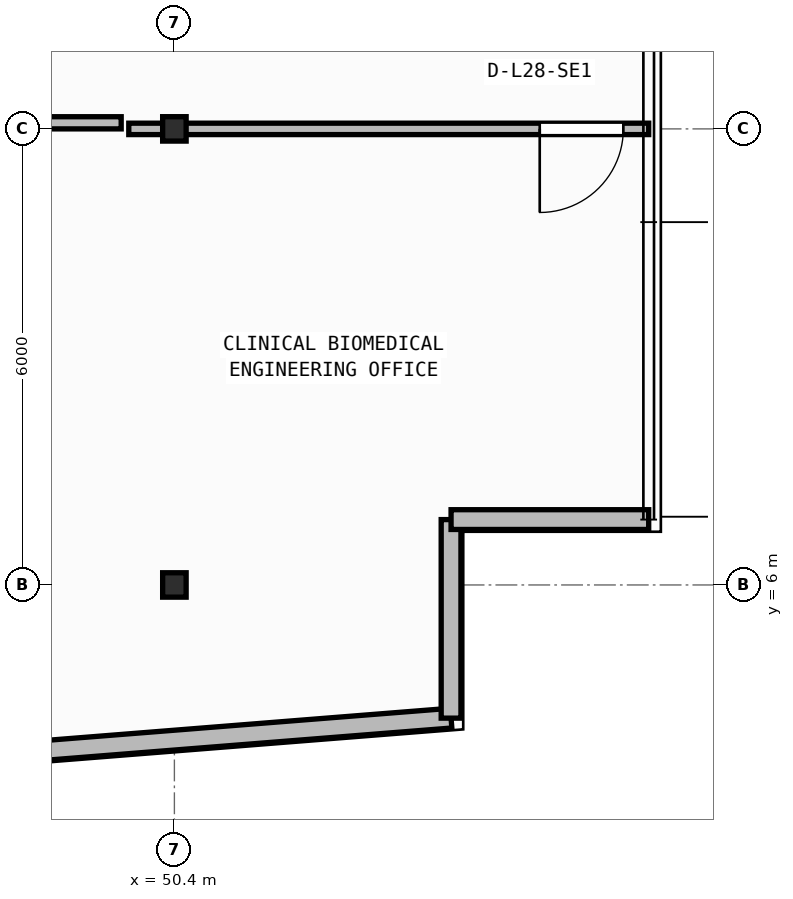
"""IFC4 building model, lengths in metres.
Left out: names, types, materials, properties, quantities, classifications, styles, units other than length and angle.
Written with IfcOpenShell. Run it as: python <this file> out.ifc"""

import sys

from ifc_helpers import new_model, si_unit, direction, frame, frame_2d, origin, origin_2d, place, context, subcontext, project, spatial, rectangle, i_section, extrude, element, fill, save


model = new_model("IFC4")
c1 = context("Model", 3, precision=1e-05, world=origin(), true_north=direction((0.0, 1.0)))
c2 = subcontext(c1, "Body", "Model", "MODEL_VIEW")
j1 = project(units=[si_unit("LENGTHUNIT", "METRE"), si_unit("PLANEANGLEUNIT", "RADIAN")], contexts=[c1])
p1 = place(None, origin())
s1 = spatial("IfcSite", under=j1, at=p1, CompositionType="ELEMENT")
p2 = place(p1, origin())
s2 = spatial("IfcBuilding", under=s1, at=p2, CompositionType="ELEMENT")
p3 = place(p2, frame((0.0, 0.0, 115.2)))
s3 = spatial("IfcBuildingStorey", under=s2, at=p3, CompositionType="ELEMENT", Elevation=115.2)
for number, where, z_axis, x_axis in (
    (1, (50.4, 6.0, 0.0), (0.0, 0.0, 1.0), (1.0, 0.0, 0.0)),
    (2, (50.4, 12.0, 0.0), (0.0, 0.0, 1.0), (1.0, 0.0, 0.0)),
):
    element("IfcColumn", number, at=place(p3, frame(where, z_axis=z_axis, x_axis=x_axis)), inside=s3, PredefinedType="COLUMN", context=c2, shape_type="SweptSolid", body=[
        extrude(i_section(OverallWidth=0.309, OverallDepth=0.321, WebThickness=0.014, FlangeThickness=0.022, FilletRadius=0.017, at=origin_2d()), origin(), (0.0, 0.0, 1.0), 3.95),
    ])
p4 = place(p3, frame((2.76, 0.173, 0.0), z_axis=(0.0, 0.0, 1.0), x_axis=(0.996857931723, 0.079210251617, 0.0)))
e3 = element("IfcWall", 3, at=p4, inside=s3, PredefinedType="STANDARD", context=c2, shape_type="SweptSolid", body=[
    extrude(rectangle(XDim=51.442, YDim=0.26, at=frame_2d((25.721, 0.0))), origin(), (0.0, 0.0, 1.0), 3.71),
])
p5 = place(p4, frame((24.521, 0.0, 0.9)))
e4 = element("IfcOpeningElement", 4, at=p5, cuts=e3, PredefinedType="OPENING", context=c2, shape_type="SweptSolid", body=[
    extrude(rectangle(XDim=2.4, YDim=1.65, at=frame_2d((1.2, 0.825))), frame((0.0, 0.14, 0.0), z_axis=(0.0, -1.0, 0.0), x_axis=(1.0, 0.0, 0.0)), (0.0, 0.0, 1.0), 0.28),
])
p6 = place(p3, frame((54.04, 4.248, 0.0), z_axis=(0.0, 0.0, 1.0), x_axis=(0.0, 1.0, 0.0)))
e5 = element("IfcWall", 5, at=p6, inside=s3, PredefinedType="STANDARD", context=c2, shape_type="SweptSolid", body=[
    extrude(rectangle(XDim=2.612, YDim=0.26, at=frame_2d((1.306, 0.0))), origin(), (0.0, 0.0, 1.0), 3.71),
])
p7 = place(p3, frame((54.04, 6.86, 0.0), z_axis=(0.0, 0.0, 1.0), x_axis=(1.0, 0.0, 0.0)))
e6 = element("IfcWall", 6, at=p7, inside=s3, PredefinedType="STANDARD", context=c2, shape_type="SweptSolid", body=[
    extrude(rectangle(XDim=2.6, YDim=0.26, at=frame_2d((1.3, 0.0))), origin(), (0.0, 0.0, 1.0), 3.71),
])
p8 = place(p3, frame((56.64, 12.0, 0.0), z_axis=(0.0, 0.0, 1.0), x_axis=(-1.0, 0.0, 0.0)))
e7 = element("IfcWall", 7, at=p8, inside=s3, PredefinedType="PARTITIONING", context=c2, shape_type="SweptSolid", body=[
    extrude(rectangle(XDim=6.84, YDim=0.15, at=frame_2d((3.42, 0.0))), origin(), (0.0, 0.0, 1.0), 3.083),
])
p9 = place(p8, frame((0.333, 0.0, 0.0)))
e8 = element("IfcOpeningElement", 8, at=p9, cuts=e7, PredefinedType="OPENING", context=c2, shape_type="SweptSolid", body=[
    extrude(rectangle(XDim=1.1, YDim=2.1, at=frame_2d((0.55, 1.05))), frame((0.0, 0.085, 0.0), z_axis=(0.0, -1.0, 0.0), x_axis=(1.0, 0.0, 0.0)), (0.0, 0.0, 1.0), 0.17),
])
p10 = place(p3, frame((46.689, 12.08, 0.0), z_axis=(0.0, 0.0, 1.0), x_axis=(1.0, 0.0, 0.0)))
e9 = element("IfcWall", 9, at=p10, inside=s3, PredefinedType="PARTITIONING", context=c2, shape_type="SweptSolid", body=[
    extrude(rectangle(XDim=3.011, YDim=0.16, at=frame_2d((1.505, 0.0))), origin(), (0.0, 0.0, 1.0), 3.083),
])
p11 = place(p9, origin())
e10 = element("IfcDoor", 10, at=p11, inside=s3, OperationType="SINGLE_SWING_RIGHT", PredefinedType="DOOR", context=c2, shape_type="SweptSolid", body=[
    extrude(rectangle(XDim=1.1, YDim=2.1, at=frame_2d((0.55, 1.05))), frame((0.0, 0.025, 0.0), z_axis=(0.0, -1.0, 0.0), x_axis=(1.0, 0.0, 0.0)), (0.0, 0.0, 1.0), 0.05),
])
fill(e8, e10)
save(model, sys.argv[1])
